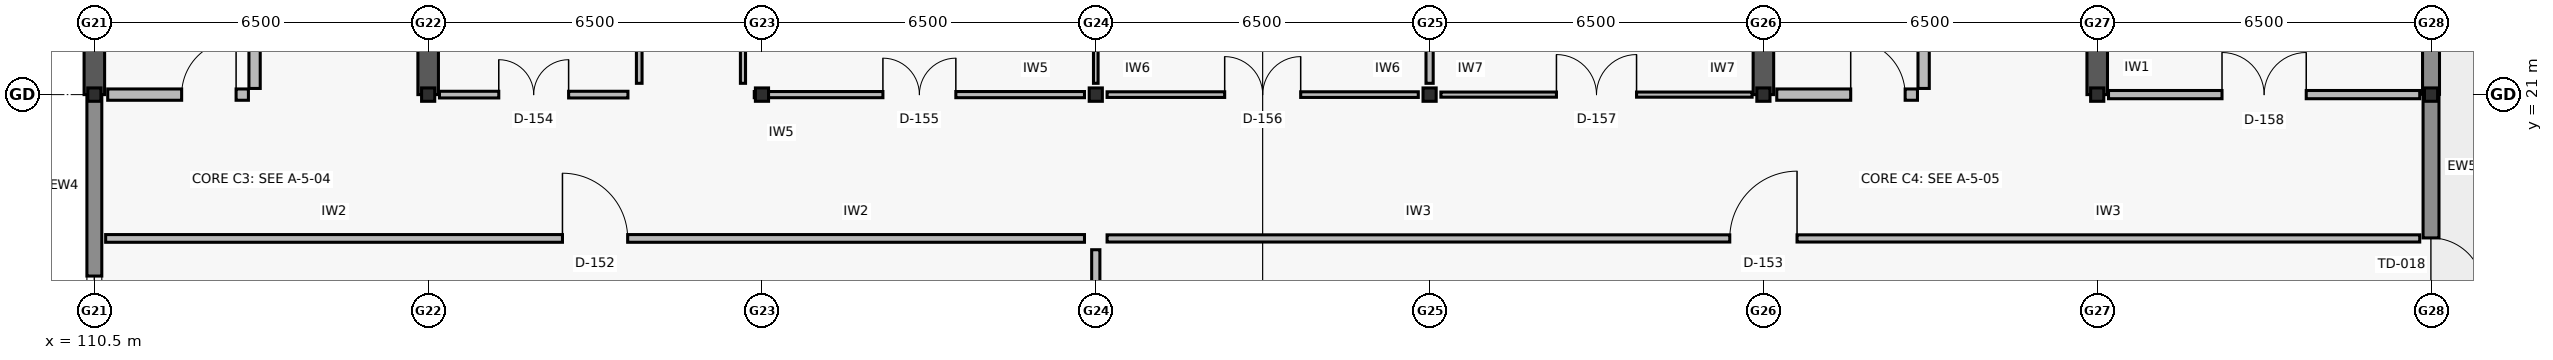
"""IFC4 building model, lengths in metres.
Left out: names, types, materials, properties, quantities, classifications, styles, units other than length and angle.
Written with IfcOpenShell. Run it as: python <this file> out.ifc"""

import sys

from ifc_helpers import new_model, si_unit, direction, frame, frame_2d, origin, origin_2d, place, context, subcontext, project, spatial, rectangle, i_section, extrude, element, fill, save


model = new_model("IFC4")
c1 = context("Model", 3, precision=1e-05, world=origin(), true_north=direction((0.0, 1.0)))
c2 = subcontext(c1, "Body", "Model", "MODEL_VIEW")
j1 = project(units=[si_unit("LENGTHUNIT", "METRE"), si_unit("PLANEANGLEUNIT", "RADIAN")], contexts=[c1])
p1 = place(None, origin())
s1 = spatial("IfcSite", under=j1, at=p1, CompositionType="ELEMENT")
p2 = place(p1, origin())
s2 = spatial("IfcBuilding", under=s1, at=p2, CompositionType="ELEMENT")
p3 = place(p2, frame((0.0, 0.0, 17.4)))
s3 = spatial("IfcBuildingStorey", under=s2, at=p3, CompositionType="ELEMENT", Elevation=17.4)
for number, where, z_axis, x_axis in (
    (1, (110.5, 21.0, 0.0), (0.0, 0.0, 1.0), (1.0, 0.0, 0.0)),
    (2, (117.0, 21.0, 0.0), (0.0, 0.0, 1.0), (1.0, 0.0, 0.0)),
    (3, (123.5, 21.0, 0.0), (0.0, 0.0, 1.0), (1.0, 0.0, 0.0)),
    (4, (130.0, 21.0, 0.0), (0.0, 0.0, 1.0), (1.0, 0.0, 0.0)),
    (5, (136.5, 21.0, 0.0), (0.0, 0.0, 1.0), (1.0, 0.0, 0.0)),
    (6, (143.0, 21.0, 0.0), (0.0, 0.0, 1.0), (1.0, 0.0, 0.0)),
    (7, (149.5, 21.0, 0.0), (0.0, 0.0, 1.0), (1.0, 0.0, 0.0)),
    (8, (156.0, 21.0, 0.0), (0.0, 0.0, 1.0), (1.0, 0.0, 0.0)),
):
    element("IfcColumn", number, at=place(p3, frame(where, z_axis=z_axis, x_axis=x_axis)), inside=s3, PredefinedType="COLUMN", context=c2, shape_type="SweptSolid", body=[
        extrude(i_section(OverallWidth=0.256, OverallDepth=0.26, WebThickness=0.01, FlangeThickness=0.017, FilletRadius=0.013, at=origin_2d()), origin(), (0.0, 0.0, 1.0), 3.9),
    ])
for number, where, z_axis, x_axis in (
    (9, (110.5, 21.0, 0.0), (0.0, 0.0, 1.0), (0.0, 1.0, 0.0)),
    (10, (117.0, 21.0, 0.0), (0.0, 0.0, 1.0), (0.0, 1.0, 0.0)),
    (11, (143.0, 21.0, 0.0), (0.0, 0.0, 1.0), (0.0, 1.0, 0.0)),
    (12, (149.5, 21.0, 0.0), (0.0, 0.0, 1.0), (0.0, 1.0, 0.0)),
):
    element("IfcWall", number, at=place(p3, frame(where, z_axis=z_axis, x_axis=x_axis)), inside=s3, PredefinedType="SHEAR", context=c2, shape_type="SweptSolid", body=[
        extrude(rectangle(XDim=6.4, YDim=0.4, at=frame_2d((3.2, 0.0))), origin(), (0.0, 0.0, 1.0), 3.66),
    ])
p4 = place(p3, frame((110.5, 14.405, 0.0), z_axis=(0.0, 0.0, 1.0), x_axis=(0.0, 1.0, 0.0)))
e13 = element("IfcWall", 13, at=p4, inside=s3, PredefinedType="SOLIDWALL", context=c2, shape_type="SweptSolid", body=[
    extrude(rectangle(XDim=6.59, YDim=0.29, at=frame_2d((3.295, 0.0))), origin(), (0.0, 0.0, 1.0), 3.02),
])
p5 = place(p4, frame((0.762, 0.0, 0.8)))
e14 = element("IfcOpeningElement", 14, at=p5, cuts=e13, PredefinedType="OPENING", context=c2, shape_type="SweptSolid", body=[
    extrude(rectangle(XDim=2.3, YDim=1.55, at=frame_2d((1.15, 0.775))), frame((0.0, 0.155, 0.0), z_axis=(0.0, -1.0, 0.0), x_axis=(1.0, 0.0, 0.0)), (0.0, 0.0, 1.0), 0.31),
])
p6 = place(p3, frame((156.0, 20.995, 0.0), z_axis=(0.0, 0.0, 1.0), x_axis=(0.0, -1.0, 0.0)))
e15 = element("IfcWall", 15, at=p6, inside=s3, PredefinedType="SOLIDWALL", context=c2, shape_type="SweptSolid", body=[
    extrude(rectangle(XDim=6.59, YDim=0.31, at=frame_2d((3.295, 0.0))), origin(), (0.0, 0.0, 1.0), 3.02),
])
p7 = place(p6, frame((2.785, 0.0, 0.0)))
e16 = element("IfcOpeningElement", 16, at=p7, cuts=e15, PredefinedType="OPENING", context=c2, shape_type="SweptSolid", body=[
    extrude(rectangle(XDim=1.02, YDim=2.14, at=frame_2d((0.51, 1.07))), frame((0.0, 0.165, 0.0), z_axis=(0.0, -1.0, 0.0), x_axis=(1.0, 0.0, 0.0)), (0.0, 0.0, 1.0), 0.33),
])
p8 = place(p3, frame((156.0, 27.595, 0.0), z_axis=(0.0, 0.0, 1.0), x_axis=(0.0, -1.0, 0.0)))
e17 = element("IfcWall", 17, at=p8, inside=s3, PredefinedType="SOLIDWALL", context=c2, shape_type="SweptSolid", body=[
    extrude(rectangle(XDim=6.59, YDim=0.33, at=frame_2d((3.295, 0.0))), origin(), (0.0, 0.0, 1.0), 3.02),
])
p9 = place(p8, frame((2.445, 0.0, 0.8)))
e18 = element("IfcOpeningElement", 18, at=p9, cuts=e17, PredefinedType="OPENING", context=c2, shape_type="SweptSolid", body=[
    extrude(rectangle(XDim=1.7, YDim=1.95, at=frame_2d((0.85, 0.975))), frame((0.0, 0.175, 0.0), z_axis=(0.0, -1.0, 0.0), x_axis=(1.0, 0.0, 0.0)), (0.0, 0.0, 1.0), 0.35),
])
p10 = place(p3, frame((113.62, 21.12, 0.0), z_axis=(0.0, 0.0, 1.0), x_axis=(0.0, 1.0, 0.0)))
e19 = element("IfcWall", 19, at=p10, inside=s3, PredefinedType="SOLIDWALL", context=c2, shape_type="SweptSolid", body=[
    extrude(rectangle(XDim=6.255, YDim=0.22, at=frame_2d((3.127, 0.0))), origin(), (0.0, 0.0, 1.0), 3.66),
])
p11 = place(p3, frame((110.76, 21.0, 0.0), z_axis=(0.0, 0.0, 1.0), x_axis=(1.0, 0.0, 0.0)))
e20 = element("IfcWall", 20, at=p11, inside=s3, PredefinedType="SOLIDWALL", context=c2, shape_type="SweptSolid", body=[
    extrude(rectangle(XDim=2.74, YDim=0.22, at=frame_2d((1.37, 0.0))), origin(), (0.0, 0.0, 1.0), 3.02),
])
p12 = place(p11, frame((1.44, 0.0, 0.0)))
e21 = element("IfcOpeningElement", 21, at=p12, cuts=e20, PredefinedType="OPENING", context=c2, shape_type="SweptSolid", body=[
    extrude(rectangle(XDim=1.06, YDim=2.1, at=frame_2d((0.53, 1.05))), frame((0.0, 0.12, 0.0), z_axis=(0.0, -1.0, 0.0), x_axis=(1.0, 0.0, 0.0)), (0.0, 0.0, 1.0), 0.24),
])
p13 = place(p3, frame((146.12, 21.12, 0.0), z_axis=(0.0, 0.0, 1.0), x_axis=(0.0, 1.0, 0.0)))
e22 = element("IfcWall", 22, at=p13, inside=s3, PredefinedType="SOLIDWALL", context=c2, shape_type="SweptSolid", body=[
    extrude(rectangle(XDim=6.255, YDim=0.22, at=frame_2d((3.127, 0.0))), origin(), (0.0, 0.0, 1.0), 3.66),
])
p14 = place(p3, frame((143.26, 21.0, 0.0), z_axis=(0.0, 0.0, 1.0), x_axis=(1.0, 0.0, 0.0)))
e23 = element("IfcWall", 23, at=p14, inside=s3, PredefinedType="SOLIDWALL", context=c2, shape_type="SweptSolid", body=[
    extrude(rectangle(XDim=2.74, YDim=0.22, at=frame_2d((1.37, 0.0))), origin(), (0.0, 0.0, 1.0), 3.02),
])
p15 = place(p14, frame((1.44, 0.0, 0.0)))
e24 = element("IfcOpeningElement", 24, at=p15, cuts=e23, PredefinedType="OPENING", context=c2, shape_type="SweptSolid", body=[
    extrude(rectangle(XDim=1.06, YDim=2.1, at=frame_2d((0.53, 1.05))), frame((0.0, 0.12, 0.0), z_axis=(0.0, -1.0, 0.0), x_axis=(1.0, 0.0, 0.0)), (0.0, 0.0, 1.0), 0.24),
])
p16 = place(p3, frame((121.11, 21.22, 0.0), z_axis=(0.0, 0.0, 1.0), x_axis=(0.0, 1.0, 0.0)))
e25 = element("IfcWall", 25, at=p16, inside=s3, PredefinedType="PARTITIONING", context=c2, shape_type="SweptSolid", body=[
    extrude(rectangle(XDim=2.76, YDim=0.11, at=frame_2d((1.38, 0.0))), origin(), (0.0, 0.0, 1.0), 3.0),
])
p17 = place(p16, frame((0.785, 0.0, 0.0)))
e26 = element("IfcOpeningElement", 26, at=p17, cuts=e25, PredefinedType="OPENING", context=c2, shape_type="SweptSolid", body=[
    extrude(rectangle(XDim=1.19, YDim=2.14, at=frame_2d((0.595, 1.07))), frame((0.0, 0.065, 0.0), z_axis=(0.0, -1.0, 0.0), x_axis=(1.0, 0.0, 0.0)), (0.0, 0.0, 1.0), 0.13),
])
p18 = place(p3, frame((123.13, 21.22, 0.0), z_axis=(0.0, 0.0, 1.0), x_axis=(0.0, 1.0, 0.0)))
e27 = element("IfcWall", 27, at=p18, inside=s3, PredefinedType="PARTITIONING", context=c2, shape_type="SweptSolid", body=[
    extrude(rectangle(XDim=2.76, YDim=0.1, at=frame_2d((1.38, 0.0))), origin(), (0.0, 0.0, 1.0), 3.0),
])
p19 = place(p18, frame((0.765, 0.0, 0.0)))
e28 = element("IfcOpeningElement", 28, at=p19, cuts=e27, PredefinedType="OPENING", context=c2, shape_type="SweptSolid", body=[
    extrude(rectangle(XDim=1.23, YDim=2.08, at=frame_2d((0.615, 1.04))), frame((0.0, 0.06, 0.0), z_axis=(0.0, -1.0, 0.0), x_axis=(1.0, 0.0, 0.0)), (0.0, 0.0, 1.0), 0.12),
])
p20 = place(p3, frame((130.0, 8.02, 0.0), z_axis=(0.0, 0.0, 1.0), x_axis=(0.0, 1.0, 0.0)))
e29 = element("IfcWall", 29, at=p20, inside=s3, PredefinedType="PARTITIONING", context=c2, shape_type="SweptSolid", body=[
    extrude(rectangle(XDim=9.96, YDim=0.16, at=frame_2d((4.98, 0.0))), origin(), (0.0, 0.0, 1.0), 3.0),
])
p21 = place(p3, frame((110.72, 18.2, 0.0), z_axis=(0.0, 0.0, 1.0), x_axis=(1.0, 0.0, 0.0)))
e30 = element("IfcWall", 30, at=p21, inside=s3, PredefinedType="PARTITIONING", context=c2, shape_type="SweptSolid", body=[
    extrude(rectangle(XDim=19.06, YDim=0.15, at=frame_2d((9.53, 0.0))), origin(), (0.0, 0.0, 1.0), 3.0),
])
p22 = place(p21, frame((8.895, 0.0, 0.0)))
e31 = element("IfcOpeningElement", 31, at=p22, cuts=e30, PredefinedType="OPENING", context=c2, shape_type="SweptSolid", body=[
    extrude(rectangle(XDim=1.27, YDim=2.1, at=frame_2d((0.635, 1.05))), frame((0.0, 0.085, 0.0), z_axis=(0.0, -1.0, 0.0), x_axis=(1.0, 0.0, 0.0)), (0.0, 0.0, 1.0), 0.17),
])
p23 = place(p3, frame((130.22, 18.2, 0.0), z_axis=(0.0, 0.0, 1.0), x_axis=(1.0, 0.0, 0.0)))
e32 = element("IfcWall", 32, at=p23, inside=s3, PredefinedType="PARTITIONING", context=c2, shape_type="SweptSolid", body=[
    extrude(rectangle(XDim=25.56, YDim=0.14, at=frame_2d((12.78, 0.0))), origin(), (0.0, 0.0, 1.0), 3.0),
])
p24 = place(p23, frame((12.125, 0.0, 0.0)))
e33 = element("IfcOpeningElement", 33, at=p24, cuts=e32, PredefinedType="OPENING", context=c2, shape_type="SweptSolid", body=[
    extrude(rectangle(XDim=1.31, YDim=2.14, at=frame_2d((0.655, 1.07))), frame((0.0, 0.08, 0.0), z_axis=(0.0, -1.0, 0.0), x_axis=(1.0, 0.0, 0.0)), (0.0, 0.0, 1.0), 0.16),
])
p25 = place(p3, frame((117.22, 21.0, 0.0), z_axis=(0.0, 0.0, 1.0), x_axis=(1.0, 0.0, 0.0)))
e34 = element("IfcWall", 34, at=p25, inside=s3, PredefinedType="PARTITIONING", context=c2, shape_type="SweptSolid", body=[
    extrude(rectangle(XDim=3.67, YDim=0.13, at=frame_2d((1.835, 0.0))), origin(), (0.0, 0.0, 1.0), 3.0),
])
p26 = place(p25, frame((1.155, 0.0, 0.0)))
e35 = element("IfcOpeningElement", 35, at=p26, cuts=e34, PredefinedType="OPENING", context=c2, shape_type="SweptSolid", body=[
    extrude(rectangle(XDim=1.36, YDim=2.15, at=frame_2d((0.68, 1.075))), frame((0.0, 0.075, 0.0), z_axis=(0.0, -1.0, 0.0), x_axis=(1.0, 0.0, 0.0)), (0.0, 0.0, 1.0), 0.15),
])
p27 = place(p3, frame((123.35, 21.0, 0.0), z_axis=(0.0, 0.0, 1.0), x_axis=(1.0, 0.0, 0.0)))
e36 = element("IfcWall", 36, at=p27, inside=s3, PredefinedType="PARTITIONING", context=c2, shape_type="SweptSolid", body=[
    extrude(rectangle(XDim=6.43, YDim=0.12, at=frame_2d((3.215, 0.0))), origin(), (0.0, 0.0, 1.0), 3.0),
])
p28 = place(p27, frame((2.505, 0.0, 0.0)))
e37 = element("IfcOpeningElement", 37, at=p28, cuts=e36, PredefinedType="OPENING", context=c2, shape_type="SweptSolid", body=[
    extrude(rectangle(XDim=1.42, YDim=2.15, at=frame_2d((0.71, 1.075))), frame((0.0, 0.07, 0.0), z_axis=(0.0, -1.0, 0.0), x_axis=(1.0, 0.0, 0.0)), (0.0, 0.0, 1.0), 0.14),
])
p29 = place(p3, frame((130.22, 21.0, 0.0), z_axis=(0.0, 0.0, 1.0), x_axis=(1.0, 0.0, 0.0)))
e38 = element("IfcWall", 38, at=p29, inside=s3, PredefinedType="PARTITIONING", context=c2, shape_type="SweptSolid", body=[
    extrude(rectangle(XDim=6.06, YDim=0.11, at=frame_2d((3.03, 0.0))), origin(), (0.0, 0.0, 1.0), 3.0),
])
p30 = place(p29, frame((2.29, 0.0, 0.0)))
e39 = element("IfcOpeningElement", 39, at=p30, cuts=e38, PredefinedType="OPENING", context=c2, shape_type="SweptSolid", body=[
    extrude(rectangle(XDim=1.48, YDim=2.18, at=frame_2d((0.74, 1.09))), frame((0.0, 0.065, 0.0), z_axis=(0.0, -1.0, 0.0), x_axis=(1.0, 0.0, 0.0)), (0.0, 0.0, 1.0), 0.13),
])
p31 = place(p3, frame((136.72, 21.0, 0.0), z_axis=(0.0, 0.0, 1.0), x_axis=(1.0, 0.0, 0.0)))
e40 = element("IfcWall", 40, at=p31, inside=s3, PredefinedType="PARTITIONING", context=c2, shape_type="SweptSolid", body=[
    extrude(rectangle(XDim=6.06, YDim=0.1, at=frame_2d((3.03, 0.0))), origin(), (0.0, 0.0, 1.0), 3.0),
])
p32 = place(p31, frame((2.25, 0.0, 0.0)))
e41 = element("IfcOpeningElement", 41, at=p32, cuts=e40, PredefinedType="OPENING", context=c2, shape_type="SweptSolid", body=[
    extrude(rectangle(XDim=1.56, YDim=2.18, at=frame_2d((0.78, 1.09))), frame((0.0, 0.06, 0.0), z_axis=(0.0, -1.0, 0.0), x_axis=(1.0, 0.0, 0.0)), (0.0, 0.0, 1.0), 0.12),
])
p33 = place(p3, frame((149.72, 21.0, 0.0), z_axis=(0.0, 0.0, 1.0), x_axis=(1.0, 0.0, 0.0)))
e42 = element("IfcWall", 42, at=p33, inside=s3, PredefinedType="PARTITIONING", context=c2, shape_type="SweptSolid", body=[
    extrude(rectangle(XDim=6.06, YDim=0.16, at=frame_2d((3.03, 0.0))), origin(), (0.0, 0.0, 1.0), 3.0),
])
p34 = place(p33, frame((2.21, 0.0, 0.0)))
e43 = element("IfcOpeningElement", 43, at=p34, cuts=e42, PredefinedType="OPENING", context=c2, shape_type="SweptSolid", body=[
    extrude(rectangle(XDim=1.64, YDim=2.2, at=frame_2d((0.82, 1.1))), frame((0.0, 0.09, 0.0), z_axis=(0.0, -1.0, 0.0), x_axis=(1.0, 0.0, 0.0)), (0.0, 0.0, 1.0), 0.18),
])
p35 = place(p3, frame((130.0, 21.22, 0.0), z_axis=(0.0, 0.0, 1.0), x_axis=(0.0, 1.0, 0.0)))
e44 = element("IfcWall", 44, at=p35, inside=s3, PredefinedType="MOVABLE", context=c2, shape_type="SweptSolid", body=[
    extrude(rectangle(XDim=6.16, YDim=0.09, at=frame_2d((3.08, 0.0))), origin(), (0.0, 0.0, 1.0), 3.0),
])
p36 = place(p3, frame((136.5, 21.22, 0.0), z_axis=(0.0, 0.0, 1.0), x_axis=(0.0, 1.0, 0.0)))
e45 = element("IfcWall", 45, at=p36, inside=s3, PredefinedType="PARTITIONING", context=c2, shape_type="SweptSolid", body=[
    extrude(rectangle(XDim=6.16, YDim=0.14, at=frame_2d((3.08, 0.0))), origin(), (0.0, 0.0, 1.0), 3.0),
])
p37 = place(p5, origin())
e46 = element("IfcWindow", 46, at=p37, inside=s3, PartitioningType="DOUBLE_PANEL_VERTICAL", PredefinedType="WINDOW", context=c2, shape_type="SweptSolid", body=[
    extrude(rectangle(XDim=2.3, YDim=1.55, at=frame_2d((1.15, 0.775))), frame((0.0, 0.03, 0.0), z_axis=(0.0, -1.0, 0.0), x_axis=(1.0, 0.0, 0.0)), (0.0, 0.0, 1.0), 0.06),
])
fill(e14, e46)
p38 = place(p7, origin())
e47 = element("IfcDoor", 47, at=p38, inside=s3, OperationType="SINGLE_SWING_RIGHT", PredefinedType="DOOR", context=c2, shape_type="SweptSolid", body=[
    extrude(rectangle(XDim=1.02, YDim=2.14, at=frame_2d((0.51, 1.07))), frame((0.0, 0.025, 0.0), z_axis=(0.0, -1.0, 0.0), x_axis=(1.0, 0.0, 0.0)), (0.0, 0.0, 1.0), 0.05),
])
fill(e16, e47)
p39 = place(p12, origin())
e48 = element("IfcDoor", 48, at=p39, inside=s3, OperationType="SINGLE_SWING_RIGHT", PredefinedType="DOOR", context=c2, shape_type="SweptSolid", body=[
    extrude(rectangle(XDim=1.06, YDim=2.1, at=frame_2d((0.53, 1.05))), frame((0.0, 0.025, 0.0), z_axis=(0.0, -1.0, 0.0), x_axis=(1.0, 0.0, 0.0)), (0.0, 0.0, 1.0), 0.05),
])
fill(e21, e48)
p40 = place(p15, origin())
e49 = element("IfcDoor", 49, at=p40, inside=s3, OperationType="SINGLE_SWING_LEFT", PredefinedType="DOOR", context=c2, shape_type="SweptSolid", body=[
    extrude(rectangle(XDim=1.06, YDim=2.1, at=frame_2d((0.53, 1.05))), frame((0.0, 0.025, 0.0), z_axis=(0.0, -1.0, 0.0), x_axis=(1.0, 0.0, 0.0)), (0.0, 0.0, 1.0), 0.05),
])
fill(e24, e49)
p41 = place(p22, origin())
e50 = element("IfcDoor", 50, at=p41, inside=s3, OperationType="SINGLE_SWING_LEFT", PredefinedType="DOOR", context=c2, shape_type="SweptSolid", body=[
    extrude(rectangle(XDim=1.27, YDim=2.1, at=frame_2d((0.635, 1.05))), frame((0.0, 0.025, 0.0), z_axis=(0.0, -1.0, 0.0), x_axis=(1.0, 0.0, 0.0)), (0.0, 0.0, 1.0), 0.05),
])
fill(e31, e50)
p42 = place(p24, origin())
e51 = element("IfcDoor", 51, at=p42, inside=s3, OperationType="SINGLE_SWING_RIGHT", PredefinedType="DOOR", context=c2, shape_type="SweptSolid", body=[
    extrude(rectangle(XDim=1.31, YDim=2.14, at=frame_2d((0.655, 1.07))), frame((0.0, 0.025, 0.0), z_axis=(0.0, -1.0, 0.0), x_axis=(1.0, 0.0, 0.0)), (0.0, 0.0, 1.0), 0.05),
])
fill(e33, e51)
p43 = place(p26, origin())
e52 = element("IfcDoor", 52, at=p43, inside=s3, OperationType="DOUBLE_DOOR_SINGLE_SWING", PredefinedType="DOOR", context=c2, shape_type="SweptSolid", body=[
    extrude(rectangle(XDim=1.36, YDim=2.15, at=frame_2d((0.68, 1.075))), frame((0.0, 0.025, 0.0), z_axis=(0.0, -1.0, 0.0), x_axis=(1.0, 0.0, 0.0)), (0.0, 0.0, 1.0), 0.05),
])
fill(e35, e52)
p44 = place(p28, origin())
e53 = element("IfcDoor", 53, at=p44, inside=s3, OperationType="DOUBLE_DOOR_SINGLE_SWING", PredefinedType="DOOR", context=c2, shape_type="SweptSolid", body=[
    extrude(rectangle(XDim=1.42, YDim=2.15, at=frame_2d((0.71, 1.075))), frame((0.0, 0.025, 0.0), z_axis=(0.0, -1.0, 0.0), x_axis=(1.0, 0.0, 0.0)), (0.0, 0.0, 1.0), 0.05),
])
fill(e37, e53)
p45 = place(p30, origin())
e54 = element("IfcDoor", 54, at=p45, inside=s3, OperationType="DOUBLE_DOOR_SINGLE_SWING", PredefinedType="DOOR", context=c2, shape_type="SweptSolid", body=[
    extrude(rectangle(XDim=1.48, YDim=2.18, at=frame_2d((0.74, 1.09))), frame((0.0, 0.025, 0.0), z_axis=(0.0, -1.0, 0.0), x_axis=(1.0, 0.0, 0.0)), (0.0, 0.0, 1.0), 0.05),
])
fill(e39, e54)
p46 = place(p32, origin())
e55 = element("IfcDoor", 55, at=p46, inside=s3, OperationType="DOUBLE_DOOR_SINGLE_SWING", PredefinedType="DOOR", context=c2, shape_type="SweptSolid", body=[
    extrude(rectangle(XDim=1.56, YDim=2.18, at=frame_2d((0.78, 1.09))), frame((0.0, 0.025, 0.0), z_axis=(0.0, -1.0, 0.0), x_axis=(1.0, 0.0, 0.0)), (0.0, 0.0, 1.0), 0.05),
])
fill(e41, e55)
p47 = place(p34, origin())
e56 = element("IfcDoor", 56, at=p47, inside=s3, OperationType="DOUBLE_DOOR_SINGLE_SWING", PredefinedType="DOOR", context=c2, shape_type="SweptSolid", body=[
    extrude(rectangle(XDim=1.64, YDim=2.2, at=frame_2d((0.82, 1.1))), frame((0.0, 0.025, 0.0), z_axis=(0.0, -1.0, 0.0), x_axis=(1.0, 0.0, 0.0)), (0.0, 0.0, 1.0), 0.05),
])
fill(e43, e56)
save(model, sys.argv[1])
